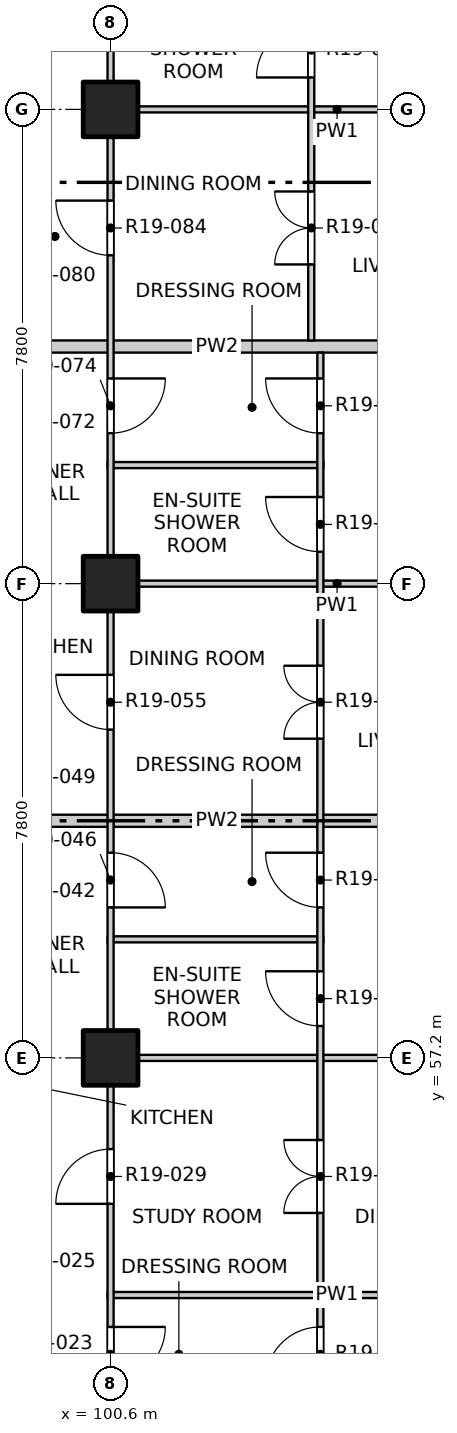
"""IFC4 building model, lengths in metres.
Left out: names, types, materials, properties, quantities, classifications, styles, units other than length and angle.
Written with IfcOpenShell. Run it as: python <this file> out.ifc"""

import sys

from ifc_helpers import new_model, si_unit, direction, frame, frame_2d, origin, origin_2d, place, context, subcontext, project, spatial, rectangle, extrude, element, fill, save


model = new_model("IFC4")
c1 = context("Model", 3, precision=1e-05, world=origin(), true_north=direction((0.0, 1.0)))
c2 = subcontext(c1, "Body", "Model", "MODEL_VIEW")
j1 = project(units=[si_unit("LENGTHUNIT", "METRE"), si_unit("PLANEANGLEUNIT", "RADIAN")], contexts=[c1])
p1 = place(None, origin())
s1 = spatial("IfcSite", under=j1, at=p1, CompositionType="ELEMENT")
p2 = place(p1, origin())
s2 = spatial("IfcBuilding", under=s1, at=p2, CompositionType="ELEMENT")
p3 = place(p2, frame((0.0, 0.0, 197.3)))
s3 = spatial("IfcBuildingStorey", under=s2, at=p3, CompositionType="ELEMENT", Elevation=197.3)
for number, where, z_axis, x_axis in (
    (1, (100.6, 57.2, -0.3), (0.0, 0.0, 1.0), (1.0, 0.0, 0.0)),
    (2, (100.6, 65.0, -0.3), (0.0, 0.0, 1.0), (1.0, 0.0, 0.0)),
    (3, (100.6, 72.8, -0.3), (0.0, 0.0, 1.0), (1.0, 0.0, 0.0)),
):
    element("IfcColumn", number, at=place(p3, frame(where, z_axis=z_axis, x_axis=x_axis)), inside=s3, PredefinedType="COLUMN", context=c2, shape_type="SweptSolid", body=[
        extrude(rectangle(XDim=0.9, YDim=0.9, at=origin_2d()), origin(), (0.0, 0.0, 1.0), 3.45),
    ])
for number, where, z_axis, x_axis in (
    (4, (100.55, 53.3, 0.0), (0.0, 0.0, 1.0), (1.0, 0.0, 0.0)),
    (5, (100.55, 57.2, 0.0), (0.0, 0.0, 1.0), (1.0, 0.0, 0.0)),
):
    element("IfcWall", number, at=place(p3, frame(where, z_axis=z_axis, x_axis=x_axis)), inside=s3, PredefinedType="PARTITIONING", context=c2, shape_type="SweptSolid", body=[
        extrude(rectangle(XDim=7.55, YDim=0.1, at=frame_2d((3.775, 0.0))), origin(), (0.0, 0.0, 1.0), 3.15),
    ])
p4 = place(p3, frame((100.55, 59.15, 0.0), z_axis=(0.0, 0.0, 1.0), x_axis=(1.0, 0.0, 0.0)))
e6 = element("IfcWall", 6, at=p4, inside=s3, PredefinedType="PARTITIONING", context=c2, shape_type="SweptSolid", body=[
    extrude(rectangle(XDim=3.55, YDim=0.1, at=frame_2d((1.775, 0.0))), origin(), (0.0, 0.0, 1.0), 3.15),
])
p5 = place(p3, frame((96.6, 61.1, 0.0), z_axis=(0.0, 0.0, 1.0), x_axis=(1.0, 0.0, 0.0)))
e7 = element("IfcWall", 7, at=p5, inside=s3, PredefinedType="PARTITIONING", context=c2, shape_type="SweptSolid", body=[
    extrude(rectangle(XDim=11.5, YDim=0.2, at=frame_2d((5.75, 0.0))), origin(), (0.0, 0.0, 1.0), 2.55),
])
p6 = place(p3, frame((100.55, 65.0, 0.0), z_axis=(0.0, 0.0, 1.0), x_axis=(1.0, 0.0, 0.0)))
e8 = element("IfcWall", 8, at=p6, inside=s3, PredefinedType="PARTITIONING", context=c2, shape_type="SweptSolid", body=[
    extrude(rectangle(XDim=7.55, YDim=0.1, at=frame_2d((3.775, 0.0))), origin(), (0.0, 0.0, 1.0), 3.15),
])
p7 = place(p3, frame((100.55, 66.95, 0.0), z_axis=(0.0, 0.0, 1.0), x_axis=(1.0, 0.0, 0.0)))
e9 = element("IfcWall", 9, at=p7, inside=s3, PredefinedType="PARTITIONING", context=c2, shape_type="SweptSolid", body=[
    extrude(rectangle(XDim=3.55, YDim=0.1, at=frame_2d((1.775, 0.0))), origin(), (0.0, 0.0, 1.0), 3.15),
])
p8 = place(p3, frame((96.6, 68.9, 0.0), z_axis=(0.0, 0.0, 1.0), x_axis=(1.0, 0.0, 0.0)))
e10 = element("IfcWall", 10, at=p8, inside=s3, PredefinedType="PARTITIONING", context=c2, shape_type="SweptSolid", body=[
    extrude(rectangle(XDim=11.5, YDim=0.2, at=frame_2d((5.75, 0.0))), origin(), (0.0, 0.0, 1.0), 2.55),
])
p9 = place(p3, frame((100.55, 72.8, 0.0), z_axis=(0.0, 0.0, 1.0), x_axis=(1.0, 0.0, 0.0)))
e11 = element("IfcWall", 11, at=p9, inside=s3, PredefinedType="PARTITIONING", context=c2, shape_type="SweptSolid", body=[
    extrude(rectangle(XDim=7.55, YDim=0.1, at=frame_2d((3.775, 0.0))), origin(), (0.0, 0.0, 1.0), 3.15),
])
p10 = place(p3, frame((100.6, 41.9, 0.0), z_axis=(0.0, 0.0, 1.0), x_axis=(0.0, 1.0, 0.0)))
e12 = element("IfcWall", 12, at=p10, inside=s3, PredefinedType="PARTITIONING", context=c2, shape_type="SweptSolid", body=[
    extrude(rectangle(XDim=46.2, YDim=0.1, at=frame_2d((23.1, 0.0))), origin(), (0.0, 0.0, 1.0), 3.15),
])
p11 = place(p10, frame((1.2, 0.0, 0.0)))
e13 = element("IfcOpeningElement", 13, at=p11, cuts=e12, PredefinedType="OPENING", context=c2, shape_type="SweptSolid", body=[
    extrude(rectangle(XDim=0.9, YDim=2.1, at=frame_2d((0.45, 1.05))), frame((0.0, 0.06, 0.0), z_axis=(0.0, -1.0, 0.0), x_axis=(1.0, 0.0, 0.0)), (0.0, 0.0, 1.0), 0.12),
])
p12 = place(p10, frame((5.1, 0.0, 0.0)))
e14 = element("IfcOpeningElement", 14, at=p12, cuts=e12, PredefinedType="OPENING", context=c2, shape_type="SweptSolid", body=[
    extrude(rectangle(XDim=0.9, YDim=2.1, at=frame_2d((0.45, 1.05))), frame((0.0, 0.06, 0.0), z_axis=(0.0, -1.0, 0.0), x_axis=(1.0, 0.0, 0.0)), (0.0, 0.0, 1.0), 0.12),
])
p13 = place(p10, frame((9.975, 0.0, 0.0)))
e15 = element("IfcOpeningElement", 15, at=p13, cuts=e12, PredefinedType="OPENING", context=c2, shape_type="SweptSolid", body=[
    extrude(rectangle(XDim=0.9, YDim=2.1, at=frame_2d((0.45, 1.05))), frame((0.0, 0.06, 0.0), z_axis=(0.0, -1.0, 0.0), x_axis=(1.0, 0.0, 0.0)), (0.0, 0.0, 1.0), 0.12),
])
p14 = place(p10, frame((12.9, 0.0, 0.0)))
e16 = element("IfcOpeningElement", 16, at=p14, cuts=e12, PredefinedType="OPENING", context=c2, shape_type="SweptSolid", body=[
    extrude(rectangle(XDim=0.9, YDim=2.1, at=frame_2d((0.45, 1.05))), frame((0.0, 0.06, 0.0), z_axis=(0.0, -1.0, 0.0), x_axis=(1.0, 0.0, 0.0)), (0.0, 0.0, 1.0), 0.12),
])
p15 = place(p10, frame((17.775, 0.0, 0.0)))
e17 = element("IfcOpeningElement", 17, at=p15, cuts=e12, PredefinedType="OPENING", context=c2, shape_type="SweptSolid", body=[
    extrude(rectangle(XDim=0.9, YDim=2.1, at=frame_2d((0.45, 1.05))), frame((0.0, 0.06, 0.0), z_axis=(0.0, -1.0, 0.0), x_axis=(1.0, 0.0, 0.0)), (0.0, 0.0, 1.0), 0.12),
])
p16 = place(p10, frame((20.7, 0.0, 0.0)))
e18 = element("IfcOpeningElement", 18, at=p16, cuts=e12, PredefinedType="OPENING", context=c2, shape_type="SweptSolid", body=[
    extrude(rectangle(XDim=0.9, YDim=2.1, at=frame_2d((0.45, 1.05))), frame((0.0, 0.06, 0.0), z_axis=(0.0, -1.0, 0.0), x_axis=(1.0, 0.0, 0.0)), (0.0, 0.0, 1.0), 0.12),
])
p17 = place(p10, frame((25.575, 0.0, 0.0)))
e19 = element("IfcOpeningElement", 19, at=p17, cuts=e12, PredefinedType="OPENING", context=c2, shape_type="SweptSolid", body=[
    extrude(rectangle(XDim=0.9, YDim=2.1, at=frame_2d((0.45, 1.05))), frame((0.0, 0.06, 0.0), z_axis=(0.0, -1.0, 0.0), x_axis=(1.0, 0.0, 0.0)), (0.0, 0.0, 1.0), 0.12),
])
p18 = place(p10, frame((28.5, 0.0, 0.0)))
e20 = element("IfcOpeningElement", 20, at=p18, cuts=e12, PredefinedType="OPENING", context=c2, shape_type="SweptSolid", body=[
    extrude(rectangle(XDim=0.9, YDim=2.1, at=frame_2d((0.45, 1.05))), frame((0.0, 0.06, 0.0), z_axis=(0.0, -1.0, 0.0), x_axis=(1.0, 0.0, 0.0)), (0.0, 0.0, 1.0), 0.12),
])
p19 = place(p10, frame((33.375, 0.0, 0.0)))
e21 = element("IfcOpeningElement", 21, at=p19, cuts=e12, PredefinedType="OPENING", context=c2, shape_type="SweptSolid", body=[
    extrude(rectangle(XDim=0.9, YDim=2.1, at=frame_2d((0.45, 1.05))), frame((0.0, 0.06, 0.0), z_axis=(0.0, -1.0, 0.0), x_axis=(1.0, 0.0, 0.0)), (0.0, 0.0, 1.0), 0.12),
])
p20 = place(p10, frame((37.225, 0.0, 0.0)))
e22 = element("IfcOpeningElement", 22, at=p20, cuts=e12, PredefinedType="OPENING", context=c2, shape_type="SweptSolid", body=[
    extrude(rectangle(XDim=0.9, YDim=2.1, at=frame_2d((0.45, 1.05))), frame((0.0, 0.06, 0.0), z_axis=(0.0, -1.0, 0.0), x_axis=(1.0, 0.0, 0.0)), (0.0, 0.0, 1.0), 0.12),
])
p21 = place(p10, frame((41.175, 0.0, 0.0)))
e23 = element("IfcOpeningElement", 23, at=p21, cuts=e12, PredefinedType="OPENING", context=c2, shape_type="SweptSolid", body=[
    extrude(rectangle(XDim=0.9, YDim=2.1, at=frame_2d((0.45, 1.05))), frame((0.0, 0.06, 0.0), z_axis=(0.0, -1.0, 0.0), x_axis=(1.0, 0.0, 0.0)), (0.0, 0.0, 1.0), 0.12),
])
p22 = place(p10, frame((44.1, 0.0, 0.0)))
e24 = element("IfcOpeningElement", 24, at=p22, cuts=e12, PredefinedType="OPENING", context=c2, shape_type="SweptSolid", body=[
    extrude(rectangle(XDim=0.9, YDim=2.1, at=frame_2d((0.45, 1.05))), frame((0.0, 0.06, 0.0), z_axis=(0.0, -1.0, 0.0), x_axis=(1.0, 0.0, 0.0)), (0.0, 0.0, 1.0), 0.12),
])
p23 = place(p3, frame((103.9, 69.0, 0.0), z_axis=(0.0, 0.0, 1.0), x_axis=(0.0, 1.0, 0.0)))
e25 = element("IfcWall", 25, at=p23, inside=s3, PredefinedType="PARTITIONING", context=c2, shape_type="SweptSolid", body=[
    extrude(rectangle(XDim=19.1, YDim=0.1, at=frame_2d((9.55, 0.0))), origin(), (0.0, 0.0, 1.0), 3.15),
])
p24 = place(p23, frame((1.25, 0.0, 0.0)))
e26 = element("IfcOpeningElement", 26, at=p24, cuts=e25, PredefinedType="OPENING", context=c2, shape_type="SweptSolid", body=[
    extrude(rectangle(XDim=1.2, YDim=2.1, at=frame_2d((0.6, 1.05))), frame((0.0, 0.06, 0.0), z_axis=(0.0, -1.0, 0.0), x_axis=(1.0, 0.0, 0.0)), (0.0, 0.0, 1.0), 0.12),
])
p25 = place(p23, frame((4.325, 0.0, 0.0)))
e27 = element("IfcOpeningElement", 27, at=p25, cuts=e25, PredefinedType="OPENING", context=c2, shape_type="SweptSolid", body=[
    extrude(rectangle(XDim=0.9, YDim=2.1, at=frame_2d((0.45, 1.05))), frame((0.0, 0.06, 0.0), z_axis=(0.0, -1.0, 0.0), x_axis=(1.0, 0.0, 0.0)), (0.0, 0.0, 1.0), 0.12),
])
p26 = place(p23, frame((6.275, 0.0, 0.0)))
e28 = element("IfcOpeningElement", 28, at=p26, cuts=e25, PredefinedType="OPENING", context=c2, shape_type="SweptSolid", body=[
    extrude(rectangle(XDim=0.9, YDim=2.1, at=frame_2d((0.45, 1.05))), frame((0.0, 0.06, 0.0), z_axis=(0.0, -1.0, 0.0), x_axis=(1.0, 0.0, 0.0)), (0.0, 0.0, 1.0), 0.12),
])
p27 = place(p23, frame((8.225, 0.0, 0.0)))
e29 = element("IfcOpeningElement", 29, at=p27, cuts=e25, PredefinedType="OPENING", context=c2, shape_type="SweptSolid", body=[
    extrude(rectangle(XDim=0.9, YDim=2.1, at=frame_2d((0.45, 1.05))), frame((0.0, 0.06, 0.0), z_axis=(0.0, -1.0, 0.0), x_axis=(1.0, 0.0, 0.0)), (0.0, 0.0, 1.0), 0.12),
])
p28 = place(p23, frame((10.175, 0.0, 0.0)))
e30 = element("IfcOpeningElement", 30, at=p28, cuts=e25, PredefinedType="OPENING", context=c2, shape_type="SweptSolid", body=[
    extrude(rectangle(XDim=0.9, YDim=2.1, at=frame_2d((0.45, 1.05))), frame((0.0, 0.06, 0.0), z_axis=(0.0, -1.0, 0.0), x_axis=(1.0, 0.0, 0.0)), (0.0, 0.0, 1.0), 0.12),
])
p29 = place(p23, frame((12.125, 0.0, 0.0)))
e31 = element("IfcOpeningElement", 31, at=p29, cuts=e25, PredefinedType="OPENING", context=c2, shape_type="SweptSolid", body=[
    extrude(rectangle(XDim=0.9, YDim=2.1, at=frame_2d((0.45, 1.05))), frame((0.0, 0.06, 0.0), z_axis=(0.0, -1.0, 0.0), x_axis=(1.0, 0.0, 0.0)), (0.0, 0.0, 1.0), 0.12),
])
p30 = place(p23, frame((14.075, 0.0, 0.0)))
e32 = element("IfcOpeningElement", 32, at=p30, cuts=e25, PredefinedType="OPENING", context=c2, shape_type="SweptSolid", body=[
    extrude(rectangle(XDim=0.9, YDim=2.1, at=frame_2d((0.45, 1.05))), frame((0.0, 0.06, 0.0), z_axis=(0.0, -1.0, 0.0), x_axis=(1.0, 0.0, 0.0)), (0.0, 0.0, 1.0), 0.12),
])
p31 = place(p23, frame((16.85, 0.0, 0.0)))
e33 = element("IfcOpeningElement", 33, at=p31, cuts=e25, PredefinedType="OPENING", context=c2, shape_type="SweptSolid", body=[
    extrude(rectangle(XDim=1.2, YDim=2.1, at=frame_2d((0.6, 1.05))), frame((0.0, 0.06, 0.0), z_axis=(0.0, -1.0, 0.0), x_axis=(1.0, 0.0, 0.0)), (0.0, 0.0, 1.0), 0.12),
])
p32 = place(p3, frame((104.05, 41.9, 0.0), z_axis=(0.0, 0.0, 1.0), x_axis=(0.0, 1.0, 0.0)))
e34 = element("IfcWall", 34, at=p32, inside=s3, PredefinedType="PARTITIONING", context=c2, shape_type="SweptSolid", body=[
    extrude(rectangle(XDim=26.9, YDim=0.1, at=frame_2d((13.45, 0.0))), origin(), (0.0, 0.0, 1.0), 3.15),
])
p33 = place(p32, frame((1.05, 0.0, 0.0)))
e35 = element("IfcOpeningElement", 35, at=p33, cuts=e34, PredefinedType="OPENING", context=c2, shape_type="SweptSolid", body=[
    extrude(rectangle(XDim=1.2, YDim=2.1, at=frame_2d((0.6, 1.05))), frame((0.0, 0.06, 0.0), z_axis=(0.0, -1.0, 0.0), x_axis=(1.0, 0.0, 0.0)), (0.0, 0.0, 1.0), 0.12),
])
p34 = place(p32, frame((4.95, 0.0, 0.0)))
e36 = element("IfcOpeningElement", 36, at=p34, cuts=e34, PredefinedType="OPENING", context=c2, shape_type="SweptSolid", body=[
    extrude(rectangle(XDim=1.2, YDim=2.1, at=frame_2d((0.6, 1.05))), frame((0.0, 0.06, 0.0), z_axis=(0.0, -1.0, 0.0), x_axis=(1.0, 0.0, 0.0)), (0.0, 0.0, 1.0), 0.12),
])
p35 = place(p32, frame((8.025, 0.0, 0.0)))
e37 = element("IfcOpeningElement", 37, at=p35, cuts=e34, PredefinedType="OPENING", context=c2, shape_type="SweptSolid", body=[
    extrude(rectangle(XDim=0.9, YDim=2.1, at=frame_2d((0.45, 1.05))), frame((0.0, 0.06, 0.0), z_axis=(0.0, -1.0, 0.0), x_axis=(1.0, 0.0, 0.0)), (0.0, 0.0, 1.0), 0.12),
])
p36 = place(p32, frame((9.975, 0.0, 0.0)))
e38 = element("IfcOpeningElement", 38, at=p36, cuts=e34, PredefinedType="OPENING", context=c2, shape_type="SweptSolid", body=[
    extrude(rectangle(XDim=0.9, YDim=2.1, at=frame_2d((0.45, 1.05))), frame((0.0, 0.06, 0.0), z_axis=(0.0, -1.0, 0.0), x_axis=(1.0, 0.0, 0.0)), (0.0, 0.0, 1.0), 0.12),
])
p37 = place(p32, frame((12.75, 0.0, 0.0)))
e39 = element("IfcOpeningElement", 39, at=p37, cuts=e34, PredefinedType="OPENING", context=c2, shape_type="SweptSolid", body=[
    extrude(rectangle(XDim=1.2, YDim=2.1, at=frame_2d((0.6, 1.05))), frame((0.0, 0.06, 0.0), z_axis=(0.0, -1.0, 0.0), x_axis=(1.0, 0.0, 0.0)), (0.0, 0.0, 1.0), 0.12),
])
p38 = place(p32, frame((15.825, 0.0, 0.0)))
e40 = element("IfcOpeningElement", 40, at=p38, cuts=e34, PredefinedType="OPENING", context=c2, shape_type="SweptSolid", body=[
    extrude(rectangle(XDim=0.9, YDim=2.1, at=frame_2d((0.45, 1.05))), frame((0.0, 0.06, 0.0), z_axis=(0.0, -1.0, 0.0), x_axis=(1.0, 0.0, 0.0)), (0.0, 0.0, 1.0), 0.12),
])
p39 = place(p32, frame((17.775, 0.0, 0.0)))
e41 = element("IfcOpeningElement", 41, at=p39, cuts=e34, PredefinedType="OPENING", context=c2, shape_type="SweptSolid", body=[
    extrude(rectangle(XDim=0.9, YDim=2.1, at=frame_2d((0.45, 1.05))), frame((0.0, 0.06, 0.0), z_axis=(0.0, -1.0, 0.0), x_axis=(1.0, 0.0, 0.0)), (0.0, 0.0, 1.0), 0.12),
])
p40 = place(p32, frame((20.55, 0.0, 0.0)))
e42 = element("IfcOpeningElement", 42, at=p40, cuts=e34, PredefinedType="OPENING", context=c2, shape_type="SweptSolid", body=[
    extrude(rectangle(XDim=1.2, YDim=2.1, at=frame_2d((0.6, 1.05))), frame((0.0, 0.06, 0.0), z_axis=(0.0, -1.0, 0.0), x_axis=(1.0, 0.0, 0.0)), (0.0, 0.0, 1.0), 0.12),
])
p41 = place(p32, frame((23.625, 0.0, 0.0)))
e43 = element("IfcOpeningElement", 43, at=p41, cuts=e34, PredefinedType="OPENING", context=c2, shape_type="SweptSolid", body=[
    extrude(rectangle(XDim=0.9, YDim=2.1, at=frame_2d((0.45, 1.05))), frame((0.0, 0.06, 0.0), z_axis=(0.0, -1.0, 0.0), x_axis=(1.0, 0.0, 0.0)), (0.0, 0.0, 1.0), 0.12),
])
p42 = place(p32, frame((25.575, 0.0, 0.0)))
e44 = element("IfcOpeningElement", 44, at=p42, cuts=e34, PredefinedType="OPENING", context=c2, shape_type="SweptSolid", body=[
    extrude(rectangle(XDim=0.9, YDim=2.1, at=frame_2d((0.45, 1.05))), frame((0.0, 0.06, 0.0), z_axis=(0.0, -1.0, 0.0), x_axis=(1.0, 0.0, 0.0)), (0.0, 0.0, 1.0), 0.12),
])
p43 = place(p13, origin())
e45 = element("IfcDoor", 45, at=p43, inside=s3, OperationType="SINGLE_SWING_LEFT", PredefinedType="DOOR", context=c2, shape_type="SweptSolid", body=[
    extrude(rectangle(XDim=0.9, YDim=2.1, at=frame_2d((0.45, 1.05))), frame((0.0, 0.025, 0.0), z_axis=(0.0, -1.0, 0.0), x_axis=(1.0, 0.0, 0.0)), (0.0, 0.0, 1.0), 0.05),
])
fill(e15, e45)
p44 = place(p36, origin())
e46 = element("IfcDoor", 46, at=p44, inside=s3, OperationType="SINGLE_SWING_LEFT", PredefinedType="DOOR", context=c2, shape_type="SweptSolid", body=[
    extrude(rectangle(XDim=0.9, YDim=2.1, at=frame_2d((0.45, 1.05))), frame((0.0, 0.025, 0.0), z_axis=(0.0, -1.0, 0.0), x_axis=(1.0, 0.0, 0.0)), (0.0, 0.0, 1.0), 0.05),
])
fill(e38, e46)
p45 = place(p14, origin())
e47 = element("IfcDoor", 47, at=p45, inside=s3, OperationType="SINGLE_SWING_LEFT", PredefinedType="DOOR", context=c2, shape_type="SweptSolid", body=[
    extrude(rectangle(XDim=0.9, YDim=2.1, at=frame_2d((0.45, 1.05))), frame((0.0, 0.025, 0.0), z_axis=(0.0, -1.0, 0.0), x_axis=(1.0, 0.0, 0.0)), (0.0, 0.0, 1.0), 0.05),
])
fill(e16, e47)
p46 = place(p37, origin())
e48 = element("IfcDoor", 48, at=p46, inside=s3, OperationType="DOUBLE_DOOR_SINGLE_SWING", PredefinedType="DOOR", context=c2, shape_type="SweptSolid", body=[
    extrude(rectangle(XDim=1.2, YDim=2.1, at=frame_2d((0.6, 1.05))), frame((0.0, 0.025, 0.0), z_axis=(0.0, -1.0, 0.0), x_axis=(1.0, 0.0, 0.0)), (0.0, 0.0, 1.0), 0.05),
])
fill(e39, e48)
p47 = place(p38, origin())
e49 = element("IfcDoor", 49, at=p47, inside=s3, OperationType="SINGLE_SWING_RIGHT", PredefinedType="DOOR", context=c2, shape_type="SweptSolid", body=[
    extrude(rectangle(XDim=0.9, YDim=2.1, at=frame_2d((0.45, 1.05))), frame((0.0, 0.025, 0.0), z_axis=(0.0, -1.0, 0.0), x_axis=(1.0, 0.0, 0.0)), (0.0, 0.0, 1.0), 0.05),
])
fill(e40, e49)
p48 = place(p15, origin())
e50 = element("IfcDoor", 50, at=p48, inside=s3, OperationType="SINGLE_SWING_RIGHT", PredefinedType="DOOR", context=c2, shape_type="SweptSolid", body=[
    extrude(rectangle(XDim=0.9, YDim=2.1, at=frame_2d((0.45, 1.05))), frame((0.0, 0.025, 0.0), z_axis=(0.0, -1.0, 0.0), x_axis=(1.0, 0.0, 0.0)), (0.0, 0.0, 1.0), 0.05),
])
fill(e17, e50)
p49 = place(p39, origin())
e51 = element("IfcDoor", 51, at=p49, inside=s3, OperationType="SINGLE_SWING_RIGHT", PredefinedType="DOOR", context=c2, shape_type="SweptSolid", body=[
    extrude(rectangle(XDim=0.9, YDim=2.1, at=frame_2d((0.45, 1.05))), frame((0.0, 0.025, 0.0), z_axis=(0.0, -1.0, 0.0), x_axis=(1.0, 0.0, 0.0)), (0.0, 0.0, 1.0), 0.05),
])
fill(e41, e51)
p50 = place(p16, origin())
e52 = element("IfcDoor", 52, at=p50, inside=s3, OperationType="SINGLE_SWING_RIGHT", PredefinedType="DOOR", context=c2, shape_type="SweptSolid", body=[
    extrude(rectangle(XDim=0.9, YDim=2.1, at=frame_2d((0.45, 1.05))), frame((0.0, 0.025, 0.0), z_axis=(0.0, -1.0, 0.0), x_axis=(1.0, 0.0, 0.0)), (0.0, 0.0, 1.0), 0.05),
])
fill(e18, e52)
p51 = place(p40, origin())
e53 = element("IfcDoor", 53, at=p51, inside=s3, OperationType="DOUBLE_DOOR_SINGLE_SWING", PredefinedType="DOOR", context=c2, shape_type="SweptSolid", body=[
    extrude(rectangle(XDim=1.2, YDim=2.1, at=frame_2d((0.6, 1.05))), frame((0.0, 0.025, 0.0), z_axis=(0.0, -1.0, 0.0), x_axis=(1.0, 0.0, 0.0)), (0.0, 0.0, 1.0), 0.05),
])
fill(e42, e53)
p52 = place(p41, origin())
e54 = element("IfcDoor", 54, at=p52, inside=s3, OperationType="SINGLE_SWING_RIGHT", PredefinedType="DOOR", context=c2, shape_type="SweptSolid", body=[
    extrude(rectangle(XDim=0.9, YDim=2.1, at=frame_2d((0.45, 1.05))), frame((0.0, 0.025, 0.0), z_axis=(0.0, -1.0, 0.0), x_axis=(1.0, 0.0, 0.0)), (0.0, 0.0, 1.0), 0.05),
])
fill(e43, e54)
p53 = place(p17, origin())
e55 = element("IfcDoor", 55, at=p53, inside=s3, OperationType="SINGLE_SWING_LEFT", PredefinedType="DOOR", context=c2, shape_type="SweptSolid", body=[
    extrude(rectangle(XDim=0.9, YDim=2.1, at=frame_2d((0.45, 1.05))), frame((0.0, 0.025, 0.0), z_axis=(0.0, -1.0, 0.0), x_axis=(1.0, 0.0, 0.0)), (0.0, 0.0, 1.0), 0.05),
])
fill(e19, e55)
p54 = place(p42, origin())
e56 = element("IfcDoor", 56, at=p54, inside=s3, OperationType="SINGLE_SWING_RIGHT", PredefinedType="DOOR", context=c2, shape_type="SweptSolid", body=[
    extrude(rectangle(XDim=0.9, YDim=2.1, at=frame_2d((0.45, 1.05))), frame((0.0, 0.025, 0.0), z_axis=(0.0, -1.0, 0.0), x_axis=(1.0, 0.0, 0.0)), (0.0, 0.0, 1.0), 0.05),
])
fill(e44, e56)
p55 = place(p18, origin())
e57 = element("IfcDoor", 57, at=p55, inside=s3, OperationType="SINGLE_SWING_RIGHT", PredefinedType="DOOR", context=c2, shape_type="SweptSolid", body=[
    extrude(rectangle(XDim=0.9, YDim=2.1, at=frame_2d((0.45, 1.05))), frame((0.0, 0.025, 0.0), z_axis=(0.0, -1.0, 0.0), x_axis=(1.0, 0.0, 0.0)), (0.0, 0.0, 1.0), 0.05),
])
fill(e20, e57)
p56 = place(p24, origin())
e58 = element("IfcDoor", 58, at=p56, inside=s3, OperationType="DOUBLE_DOOR_SINGLE_SWING", PredefinedType="DOOR", context=c2, shape_type="SweptSolid", body=[
    extrude(rectangle(XDim=1.2, YDim=2.1, at=frame_2d((0.6, 1.05))), frame((0.0, 0.025, 0.0), z_axis=(0.0, -1.0, 0.0), x_axis=(1.0, 0.0, 0.0)), (0.0, 0.0, 1.0), 0.05),
])
fill(e26, e58)
p57 = place(p25, origin())
e59 = element("IfcDoor", 59, at=p57, inside=s3, OperationType="SINGLE_SWING_LEFT", PredefinedType="DOOR", context=c2, shape_type="SweptSolid", body=[
    extrude(rectangle(XDim=0.9, YDim=2.1, at=frame_2d((0.45, 1.05))), frame((0.0, 0.025, 0.0), z_axis=(0.0, -1.0, 0.0), x_axis=(1.0, 0.0, 0.0)), (0.0, 0.0, 1.0), 0.05),
])
fill(e27, e59)
save(model, sys.argv[1])
